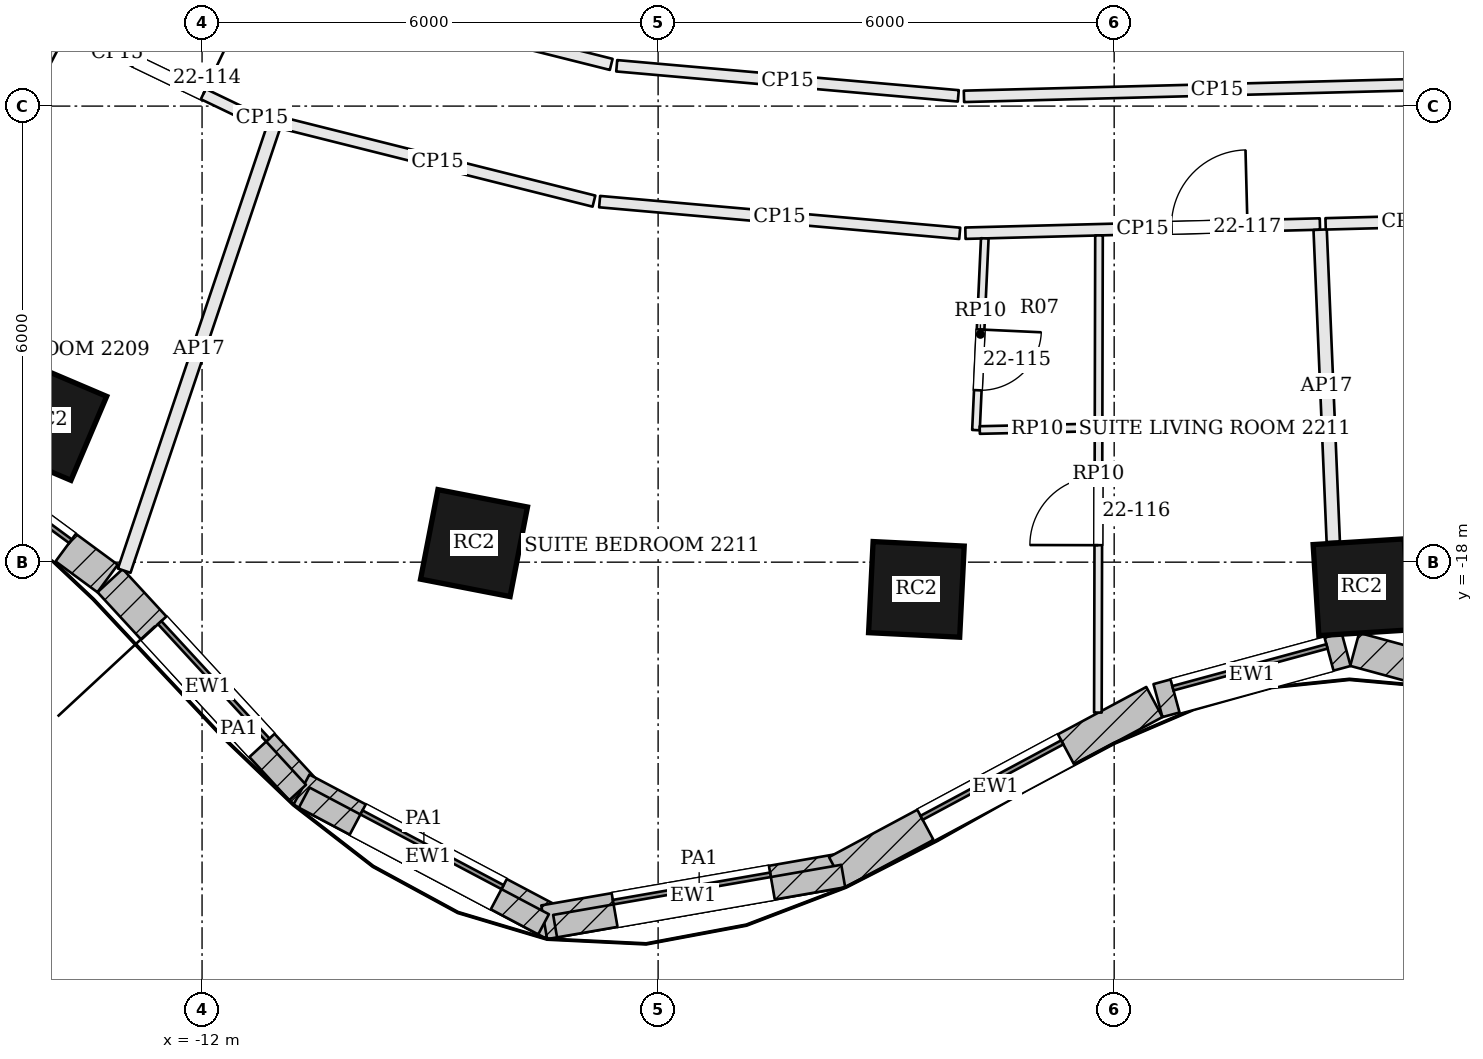
"""IFC4 building model, lengths in metres.
Left out: names, types, materials, properties, quantities, classifications, styles, units other than length and angle.
Written with IfcOpenShell. Run it as: python <this file> out.ifc"""

import sys

from ifc_helpers import new_model, si_unit, direction, frame, frame_2d, origin, origin_2d, place, context, subcontext, project, spatial, rectangle, extrude, element, fill, save


model = new_model("IFC4")
c1 = context("Model", 3, precision=1e-05, world=origin(), true_north=direction((0.0, 1.0)))
c2 = subcontext(c1, "Body", "Model", "MODEL_VIEW")
j1 = project(units=[si_unit("LENGTHUNIT", "METRE"), si_unit("PLANEANGLEUNIT", "RADIAN")], contexts=[c1])
p1 = place(None, origin())
s1 = spatial("IfcSite", under=j1, at=p1, CompositionType="ELEMENT")
p2 = place(p1, origin())
s2 = spatial("IfcBuilding", under=s1, at=p2, CompositionType="ELEMENT")
p3 = place(p2, frame((0.0, 0.0, 96.0)))
s3 = spatial("IfcBuildingStorey", under=s2, at=p3, CompositionType="ELEMENT", Elevation=96.0)
for number, where, z_axis, x_axis in (
    (1, (-14.042, -16.136, 0.0), (0.0, 0.0, 1.0), (0.92, -0.392, 0.0)),
    (2, (-8.422, -17.749, 0.0), (0.0, 0.0, 1.0), (0.982, -0.191, 0.0)),
    (3, (-2.602, -18.358, 0.0), (0.0, 0.0, 1.0), (0.999, -0.05, 0.0)),
    (4, (3.254, -18.33, 0.0), (0.0, 0.0, 1.0), (0.998, 0.063, 0.0)),
):
    element("IfcColumn", number, at=place(p3, frame(where, z_axis=z_axis, x_axis=x_axis)), inside=s3, PredefinedType="COLUMN", context=c2, shape_type="SweptSolid", body=[
        extrude(rectangle(XDim=1.2, YDim=1.2, at=origin_2d()), origin(), (0.0, 0.0, 1.0), 3.6),
    ])
p4 = place(p3, frame((-16.036, -16.158, 0.0), z_axis=(0.0, 0.0, 1.0), x_axis=(0.805181432967, -0.593028549064, 0.0)))
e5 = element("IfcWall", 5, at=p4, inside=s3, PredefinedType="SOLIDWALL", context=c2, shape_type="SweptSolid", body=[
    extrude(rectangle(XDim=3.469, YDim=0.45, at=frame_2d((1.734, 0.0))), origin(), (0.0, 0.0, 1.0), 3.4),
])
p5 = place(p4, frame((0.684, 0.0, 0.9)))
e6 = element("IfcOpeningElement", 6, at=p5, cuts=e5, PredefinedType="OPENING", context=c2, shape_type="SweptSolid", body=[
    extrude(rectangle(XDim=2.1, YDim=2.0, at=frame_2d((1.05, 1.0))), frame((0.0, 0.235, 0.0), z_axis=(0.0, -1.0, 0.0), x_axis=(1.0, 0.0, 0.0)), (0.0, 0.0, 1.0), 0.47),
])
p6 = place(p3, frame((-13.209, -18.243, 0.0), z_axis=(0.0, 0.0, 1.0), x_axis=(0.677612152497, -0.735419452278, 0.0)))
e7 = element("IfcWall", 7, at=p6, inside=s3, PredefinedType="SOLIDWALL", context=c2, shape_type="SweptSolid", body=[
    extrude(rectangle(XDim=3.797, YDim=0.45, at=frame_2d((1.898, 0.0))), origin(), (0.0, 0.0, 1.0), 3.4),
])
p7 = place(p6, frame((0.848, 0.0, 0.9)))
e8 = element("IfcOpeningElement", 8, at=p7, cuts=e7, PredefinedType="OPENING", context=c2, shape_type="SweptSolid", body=[
    extrude(rectangle(XDim=2.1, YDim=2.0, at=frame_2d((1.05, 1.0))), frame((0.0, 0.235, 0.0), z_axis=(0.0, -1.0, 0.0), x_axis=(1.0, 0.0, 0.0)), (0.0, 0.0, 1.0), 0.47),
])
p8 = place(p3, frame((-10.693, -20.993, 0.0), z_axis=(0.0, 0.0, 1.0), x_axis=(0.883817790726, -0.46783128668, 0.0)))
e9 = element("IfcWall", 9, at=p8, inside=s3, PredefinedType="SOLIDWALL", context=c2, shape_type="SweptSolid", body=[
    extrude(rectangle(XDim=3.777, YDim=0.45, at=frame_2d((1.888, 0.0))), origin(), (0.0, 0.0, 1.0), 3.4),
])
p9 = place(p8, frame((0.838, 0.0, 0.9)))
e10 = element("IfcOpeningElement", 10, at=p9, cuts=e9, PredefinedType="OPENING", context=c2, shape_type="SweptSolid", body=[
    extrude(rectangle(XDim=2.1, YDim=2.0, at=frame_2d((1.05, 1.0))), frame((0.0, 0.235, 0.0), z_axis=(0.0, -1.0, 0.0), x_axis=(1.0, 0.0, 0.0)), (0.0, 0.0, 1.0), 0.47),
])
p10 = place(p3, frame((-7.499, -22.737, 0.0), z_axis=(0.0, 0.0, 1.0), x_axis=(0.98521220506, 0.171338585849, 0.0)))
e11 = element("IfcWall", 11, at=p10, inside=s3, PredefinedType="SOLIDWALL", context=c2, shape_type="SweptSolid", body=[
    extrude(rectangle(XDim=3.98, YDim=0.45, at=frame_2d((1.99, 0.0))), origin(), (0.0, 0.0, 1.0), 3.4),
])
p11 = place(p10, frame((0.94, 0.0, 0.9)))
e12 = element("IfcOpeningElement", 12, at=p11, cuts=e11, PredefinedType="OPENING", context=c2, shape_type="SweptSolid", body=[
    extrude(rectangle(XDim=2.1, YDim=2.0, at=frame_2d((1.05, 1.0))), frame((0.0, 0.235, 0.0), z_axis=(0.0, -1.0, 0.0), x_axis=(1.0, 0.0, 0.0)), (0.0, 0.0, 1.0), 0.47),
])
p12 = place(p3, frame((-3.646, -22.079, 0.0), z_axis=(0.0, 0.0, 1.0), x_axis=(0.881279133897, 0.472596115259, 0.0)))
e13 = element("IfcWall", 13, at=p12, inside=s3, PredefinedType="SOLIDWALL", context=c2, shape_type="SweptSolid", body=[
    extrude(rectangle(XDim=4.737, YDim=0.45, at=frame_2d((2.368, 0.0))), origin(), (0.0, 0.0, 1.0), 3.4),
])
p13 = place(p12, frame((1.318, 0.0, 0.9)))
e14 = element("IfcOpeningElement", 14, at=p13, cuts=e13, PredefinedType="OPENING", context=c2, shape_type="SweptSolid", body=[
    extrude(rectangle(XDim=2.1, YDim=2.0, at=frame_2d((1.05, 1.0))), frame((0.0, 0.235, 0.0), z_axis=(0.0, -1.0, 0.0), x_axis=(1.0, 0.0, 0.0)), (0.0, 0.0, 1.0), 0.47),
])
p14 = place(p3, frame((0.576, -19.821, 0.0), z_axis=(0.0, 0.0, 1.0), x_axis=(0.965009398019, 0.262215296532, 0.0)))
e15 = element("IfcWall", 15, at=p14, inside=s3, PredefinedType="SOLIDWALL", context=c2, shape_type="SweptSolid", body=[
    extrude(rectangle(XDim=2.565, YDim=0.45, at=frame_2d((1.283, 0.0))), origin(), (0.0, 0.0, 1.0), 3.4),
])
p15 = place(p14, frame((0.233, 0.0, 0.9)))
e16 = element("IfcOpeningElement", 16, at=p15, cuts=e15, PredefinedType="OPENING", context=c2, shape_type="SweptSolid", body=[
    extrude(rectangle(XDim=2.1, YDim=2.0, at=frame_2d((1.05, 1.0))), frame((0.0, 0.235, 0.0), z_axis=(0.0, -1.0, 0.0), x_axis=(1.0, 0.0, 0.0)), (0.0, 0.0, 1.0), 0.47),
])
p16 = place(p3, frame((3.164, -19.147, 0.0), z_axis=(0.0, 0.0, 1.0), x_axis=(0.965039479998, -0.262104563191, 0.0)))
e17 = element("IfcWall", 17, at=p16, inside=s3, PredefinedType="SOLIDWALL", context=c2, shape_type="SweptSolid", body=[
    extrude(rectangle(XDim=3.672, YDim=0.45, at=frame_2d((1.836, 0.0))), origin(), (0.0, 0.0, 1.0), 3.4),
])
p17 = place(p16, frame((0.786, 0.0, 0.9)))
e18 = element("IfcOpeningElement", 18, at=p17, cuts=e17, PredefinedType="OPENING", context=c2, shape_type="SweptSolid", body=[
    extrude(rectangle(XDim=2.1, YDim=2.0, at=frame_2d((1.05, 1.0))), frame((0.0, 0.235, 0.0), z_axis=(0.0, -1.0, 0.0), x_axis=(1.0, 0.0, 0.0)), (0.0, 0.0, 1.0), 0.47),
])
p18 = place(p3, frame((-12.288, -19.354, 3.6), z_axis=(0.0, 0.0, 1.0), x_axis=(0.677603807485, -0.735427141246, 0.0)))
e19 = element("IfcWall", 19, at=p18, inside=s3, PredefinedType="PARAPET", context=c2, shape_type="SweptSolid", body=[
    extrude(rectangle(XDim=2.28, YDim=0.3, at=frame_2d((1.14, 0.0))), origin(), (0.0, 0.0, 1.0), 1.1),
])
p19 = place(p3, frame((-10.656, -21.097, 3.6), z_axis=(0.0, 0.0, 1.0), x_axis=(0.883797916666, -0.467868830439, 0.0)))
e20 = element("IfcWall", 20, at=p19, inside=s3, PredefinedType="PARAPET", context=c2, shape_type="SweptSolid", body=[
    extrude(rectangle(XDim=3.563, YDim=0.3, at=frame_2d((1.781, 0.0))), origin(), (0.0, 0.0, 1.0), 1.1),
])
p20 = place(p3, frame((-7.355, -22.789, 3.6), z_axis=(0.0, 0.0, 1.0), x_axis=(0.985201040548, 0.171402770404, 0.0)))
e21 = element("IfcWall", 21, at=p20, inside=s3, PredefinedType="PARAPET", context=c2, shape_type="SweptSolid", body=[
    extrude(rectangle(XDim=3.847, YDim=0.3, at=frame_2d((1.924, 0.0))), origin(), (0.0, 0.0, 1.0), 1.1),
])
p21 = place(p3, frame((-14.771, -10.503, 0.0), z_axis=(0.0, 0.0, 1.0), x_axis=(0.901503349553, -0.432772123346, 0.0)))
e22 = element("IfcWall", 22, at=p21, inside=s3, PredefinedType="PARTITIONING", context=c2, shape_type="SweptSolid", body=[
    extrude(rectangle(XDim=3.673, YDim=0.15, at=frame_2d((1.836, 0.0))), origin(), (0.0, 0.0, 1.0), 2.784),
])
p22 = place(p21, frame((2.092, 0.0, 0.0)))
e23 = element("IfcOpeningElement", 23, at=p22, cuts=e22, PredefinedType="OPENING", context=c2, shape_type="SweptSolid", body=[
    extrude(rectangle(XDim=1.0, YDim=2.1, at=frame_2d((0.5, 1.05))), frame((0.0, 0.085, 0.0), z_axis=(0.0, -1.0, 0.0), x_axis=(1.0, 0.0, 0.0)), (0.0, 0.0, 1.0), 0.17),
])
p23 = place(p3, frame((-11.387, -12.111, 0.0), z_axis=(0.0, 0.0, 1.0), x_axis=(0.969945028314, -0.243324150157, 0.0)))
e24 = element("IfcWall", 24, at=p23, inside=s3, PredefinedType="PARTITIONING", context=c2, shape_type="SweptSolid", body=[
    extrude(rectangle(XDim=0.364, YDim=0.15, at=frame_2d((0.182, 0.0))), origin(), (0.0, 0.0, 1.0), 2.784),
])
p24 = place(p3, frame((-13.024, -18.112, 0.0), z_axis=(0.0, 0.0, 1.0), x_axis=(0.319078434674, 0.947728311556, 0.0)))
e25 = element("IfcWall", 25, at=p24, inside=s3, PredefinedType="PARTITIONING", context=c2, shape_type="SweptSolid", body=[
    extrude(rectangle(XDim=6.163, YDim=0.175, at=frame_2d((3.082, 0.0))), origin(), (0.0, 0.0, 1.0), 2.784),
])
p25 = place(p3, frame((-10.961, -12.218, 0.0), z_axis=(0.0, 0.0, 1.0), x_axis=(0.969990045386, -0.243144631551, 0.0)))
e26 = element("IfcWall", 26, at=p25, inside=s3, PredefinedType="PARTITIONING", context=c2, shape_type="SweptSolid", body=[
    extrude(rectangle(XDim=4.244, YDim=0.15, at=frame_2d((2.122, 0.0))), origin(), (0.0, 0.0, 1.0), 2.784),
])
p26 = place(p3, frame((-6.77, -13.257, 0.0), z_axis=(0.0, 0.0, 1.0), x_axis=(0.996139758015, -0.08778144737, 0.0)))
e27 = element("IfcWall", 27, at=p26, inside=s3, PredefinedType="PARTITIONING", context=c2, shape_type="SweptSolid", body=[
    extrude(rectangle(XDim=4.756, YDim=0.15, at=frame_2d((2.378, 0.0))), origin(), (0.0, 0.0, 1.0), 2.784),
])
p27 = place(p3, frame((-1.957, -13.672, 0.0), z_axis=(0.0, 0.0, 1.0), x_axis=(0.999664413823, 0.025904820691, 0.0)))
e28 = element("IfcWall", 28, at=p27, inside=s3, PredefinedType="PARTITIONING", context=c2, shape_type="SweptSolid", body=[
    extrude(rectangle(XDim=4.665, YDim=0.15, at=frame_2d((2.333, 0.0))), origin(), (0.0, 0.0, 1.0), 2.784),
])
p28 = place(p27, frame((2.712, 0.0, 0.0)))
e29 = element("IfcOpeningElement", 29, at=p28, cuts=e28, PredefinedType="OPENING", context=c2, shape_type="SweptSolid", body=[
    extrude(rectangle(XDim=1.0, YDim=2.1, at=frame_2d((0.5, 1.05))), frame((0.0, 0.085, 0.0), z_axis=(0.0, -1.0, 0.0), x_axis=(1.0, 0.0, 0.0)), (0.0, 0.0, 1.0), 0.17),
])
p29 = place(p3, frame((2.882, -17.732, 0.0), z_axis=(0.0, 0.0, 1.0), x_axis=(-0.042001196053, 0.999117560415, 0.0)))
e30 = element("IfcWall", 30, at=p29, inside=s3, PredefinedType="PARTITIONING", context=c2, shape_type="SweptSolid", body=[
    extrude(rectangle(XDim=4.11, YDim=0.175, at=frame_2d((2.055, 0.0))), origin(), (0.0, 0.0, 1.0), 2.784),
])
p30 = place(p3, frame((2.781, -13.549, 0.0), z_axis=(0.0, 0.0, 1.0), x_axis=(0.999665013714, 0.025881660615, 0.0)))
e31 = element("IfcWall", 31, at=p30, inside=s3, PredefinedType="PARTITIONING", context=c2, shape_type="SweptSolid", body=[
    extrude(rectangle(XDim=2.16, YDim=0.15, at=frame_2d((1.08, 0.0))), origin(), (0.0, 0.0, 1.0), 2.784),
])
p31 = place(p3, frame((4.684, -11.699, 0.0), z_axis=(0.0, 0.0, 1.0), x_axis=(-0.999663438204, -0.025942442425, 0.0)))
e32 = element("IfcWall", 32, at=p31, inside=s3, PredefinedType="PARTITIONING", context=c2, shape_type="SweptSolid", body=[
    extrude(rectangle(XDim=6.663, YDim=0.15, at=frame_2d((3.332, 0.0))), origin(), (0.0, 0.0, 1.0), 2.784),
])
p32 = place(p3, frame((-2.051, -11.865, 0.0), z_axis=(0.0, 0.0, 1.0), x_axis=(-0.996139599493, 0.087783246245, 0.0)))
e33 = element("IfcWall", 33, at=p32, inside=s3, PredefinedType="PARTITIONING", context=c2, shape_type="SweptSolid", body=[
    extrude(rectangle(XDim=4.511, YDim=0.15, at=frame_2d((2.255, 0.0))), origin(), (0.0, 0.0, 1.0), 2.784),
])
p33 = place(p3, frame((-6.617, -11.451, 0.0), z_axis=(0.0, 0.0, 1.0), x_axis=(-0.969987441267, 0.243155020069, 0.0)))
e34 = element("IfcWall", 34, at=p33, inside=s3, PredefinedType="PARTITIONING", context=c2, shape_type="SweptSolid", body=[
    extrude(rectangle(XDim=4.359, YDim=0.15, at=frame_2d((2.179, 0.0))), origin(), (0.0, 0.0, 1.0), 2.784),
])
p34 = place(p3, frame((-16.341, -15.862, 0.0), z_axis=(0.0, 0.0, 1.0), x_axis=(0.460149427678, 0.887841485969, 0.0)))
e35 = element("IfcWall", 35, at=p34, inside=s3, PredefinedType="PARTITIONING", context=c2, shape_type="SweptSolid", body=[
    extrude(rectangle(XDim=5.438, YDim=0.1, at=frame_2d((2.719, 0.0))), origin(), (0.0, 0.0, 1.0), 2.884),
])
p35 = place(p34, frame((1.363, 0.0, 0.0)))
e36 = element("IfcOpeningElement", 36, at=p35, cuts=e35, PredefinedType="OPENING", context=c2, shape_type="SweptSolid", body=[
    extrude(rectangle(XDim=0.9, YDim=2.4, at=frame_2d((0.45, 1.2))), frame((0.0, 0.06, 0.0), z_axis=(0.0, -1.0, 0.0), x_axis=(1.0, 0.0, 0.0)), (0.0, 0.0, 1.0), 0.12),
])
p36 = place(p3, frame((-0.214, -19.979, 0.0), z_axis=(0.0, 0.0, 1.0), x_axis=(0.002333625165, 0.999997277093, 0.0)))
e37 = element("IfcWall", 37, at=p36, inside=s3, PredefinedType="PARTITIONING", context=c2, shape_type="SweptSolid", body=[
    extrude(rectangle(XDim=6.277, YDim=0.1, at=frame_2d((3.139, 0.0))), origin(), (0.0, 0.0, 1.0), 2.884),
])
p37 = place(p36, frame((2.202, 0.0, 0.0)))
e38 = element("IfcOpeningElement", 38, at=p37, cuts=e37, PredefinedType="OPENING", context=c2, shape_type="SweptSolid", body=[
    extrude(rectangle(XDim=0.9, YDim=2.4, at=frame_2d((0.45, 1.2))), frame((0.0, 0.06, 0.0), z_axis=(0.0, -1.0, 0.0), x_axis=(1.0, 0.0, 0.0)), (0.0, 0.0, 1.0), 0.12),
])
p38 = place(p3, frame((-1.702, -13.74, 0.0), z_axis=(0.0, 0.0, 1.0), x_axis=(-0.045833111847, -0.998949110745, 0.0)))
e39 = element("IfcWall", 39, at=p38, inside=s3, PredefinedType="PARTITIONING", context=c2, shape_type="SweptSolid", body=[
    extrude(rectangle(XDim=2.525, YDim=0.1, at=frame_2d((1.262, 0.0))), origin(), (0.0, 0.0, 1.0), 2.884),
])
p39 = place(p38, frame((1.2, 0.0, 0.0)))
e40 = element("IfcOpeningElement", 40, at=p39, cuts=e39, PredefinedType="OPENING", context=c2, shape_type="SweptSolid", body=[
    extrude(rectangle(XDim=0.8, YDim=2.1, at=frame_2d((0.4, 1.05))), frame((0.0, 0.06, 0.0), z_axis=(0.0, -1.0, 0.0), x_axis=(1.0, 0.0, 0.0)), (0.0, 0.0, 1.0), 0.12),
])
p40 = place(p3, frame((-1.768, -16.262, 0.0), z_axis=(0.0, 0.0, 1.0), x_axis=(0.999748456617, 0.022428185195, 0.0)))
e41 = element("IfcWall", 41, at=p40, inside=s3, PredefinedType="PARTITIONING", context=c2, shape_type="SweptSolid", body=[
    extrude(rectangle(XDim=1.513, YDim=0.1, at=frame_2d((0.757, 0.0))), origin(), (0.0, 0.0, 1.0), 2.884),
])
p41 = place(p5, origin())
e42 = element("IfcWindow", 42, at=p41, inside=s3, PartitioningType="SINGLE_PANEL", PredefinedType="WINDOW", context=c2, shape_type="SweptSolid", body=[
    extrude(rectangle(XDim=2.1, YDim=2.0, at=frame_2d((1.05, 1.0))), frame((0.0, 0.135, 0.0), z_axis=(0.0, -1.0, 0.0), x_axis=(1.0, 0.0, 0.0)), (0.0, 0.0, 1.0), 0.06),
])
fill(e6, e42)
p42 = place(p7, origin())
e43 = element("IfcWindow", 43, at=p42, inside=s3, PartitioningType="SINGLE_PANEL", PredefinedType="WINDOW", context=c2, shape_type="SweptSolid", body=[
    extrude(rectangle(XDim=2.1, YDim=2.0, at=frame_2d((1.05, 1.0))), frame((0.0, 0.135, 0.0), z_axis=(0.0, -1.0, 0.0), x_axis=(1.0, 0.0, 0.0)), (0.0, 0.0, 1.0), 0.06),
])
fill(e8, e43)
p43 = place(p9, origin())
e44 = element("IfcWindow", 44, at=p43, inside=s3, PartitioningType="SINGLE_PANEL", PredefinedType="WINDOW", context=c2, shape_type="SweptSolid", body=[
    extrude(rectangle(XDim=2.1, YDim=2.0, at=frame_2d((1.05, 1.0))), frame((0.0, 0.135, 0.0), z_axis=(0.0, -1.0, 0.0), x_axis=(1.0, 0.0, 0.0)), (0.0, 0.0, 1.0), 0.06),
])
fill(e10, e44)
p44 = place(p11, origin())
e45 = element("IfcWindow", 45, at=p44, inside=s3, PartitioningType="SINGLE_PANEL", PredefinedType="WINDOW", context=c2, shape_type="SweptSolid", body=[
    extrude(rectangle(XDim=2.1, YDim=2.0, at=frame_2d((1.05, 1.0))), frame((0.0, 0.135, 0.0), z_axis=(0.0, -1.0, 0.0), x_axis=(1.0, 0.0, 0.0)), (0.0, 0.0, 1.0), 0.06),
])
fill(e12, e45)
p45 = place(p13, origin())
e46 = element("IfcWindow", 46, at=p45, inside=s3, PartitioningType="SINGLE_PANEL", PredefinedType="WINDOW", context=c2, shape_type="SweptSolid", body=[
    extrude(rectangle(XDim=2.1, YDim=2.0, at=frame_2d((1.05, 1.0))), frame((0.0, 0.135, 0.0), z_axis=(0.0, -1.0, 0.0), x_axis=(1.0, 0.0, 0.0)), (0.0, 0.0, 1.0), 0.06),
])
fill(e14, e46)
p46 = place(p15, origin())
e47 = element("IfcWindow", 47, at=p46, inside=s3, PartitioningType="SINGLE_PANEL", PredefinedType="WINDOW", context=c2, shape_type="SweptSolid", body=[
    extrude(rectangle(XDim=2.1, YDim=2.0, at=frame_2d((1.05, 1.0))), frame((0.0, 0.135, 0.0), z_axis=(0.0, -1.0, 0.0), x_axis=(1.0, 0.0, 0.0)), (0.0, 0.0, 1.0), 0.06),
])
fill(e16, e47)
p47 = place(p22, origin())
e48 = element("IfcDoor", 48, at=p47, inside=s3, OperationType="SINGLE_SWING_RIGHT", PredefinedType="DOOR", context=c2, shape_type="SweptSolid", body=[
    extrude(rectangle(XDim=1.0, YDim=2.1, at=frame_2d((0.5, 1.05))), frame((0.0, 0.025, 0.0), z_axis=(0.0, -1.0, 0.0), x_axis=(1.0, 0.0, 0.0)), (0.0, 0.0, 1.0), 0.05),
])
fill(e23, e48)
p48 = place(p39, origin())
e49 = element("IfcDoor", 49, at=p48, inside=s3, OperationType="SINGLE_SWING_LEFT", PredefinedType="DOOR", context=c2, shape_type="SweptSolid", body=[
    extrude(rectangle(XDim=0.8, YDim=2.1, at=frame_2d((0.4, 1.05))), frame((0.0, 0.025, 0.0), z_axis=(0.0, -1.0, 0.0), x_axis=(1.0, 0.0, 0.0)), (0.0, 0.0, 1.0), 0.05),
])
fill(e40, e49)
p49 = place(p37, origin())
e50 = element("IfcDoor", 50, at=p49, inside=s3, OperationType="SINGLE_SWING_LEFT", PredefinedType="DOOR", context=c2, shape_type="SweptSolid", body=[
    extrude(rectangle(XDim=0.9, YDim=2.4, at=frame_2d((0.45, 1.2))), frame((0.0, 0.025, 0.0), z_axis=(0.0, -1.0, 0.0), x_axis=(1.0, 0.0, 0.0)), (0.0, 0.0, 1.0), 0.05),
])
fill(e38, e50)
p50 = place(p28, origin())
e51 = element("IfcDoor", 51, at=p50, inside=s3, OperationType="SINGLE_SWING_RIGHT", PredefinedType="DOOR", context=c2, shape_type="SweptSolid", body=[
    extrude(rectangle(XDim=1.0, YDim=2.1, at=frame_2d((0.5, 1.05))), frame((0.0, 0.025, 0.0), z_axis=(0.0, -1.0, 0.0), x_axis=(1.0, 0.0, 0.0)), (0.0, 0.0, 1.0), 0.05),
])
fill(e29, e51)
save(model, sys.argv[1])
